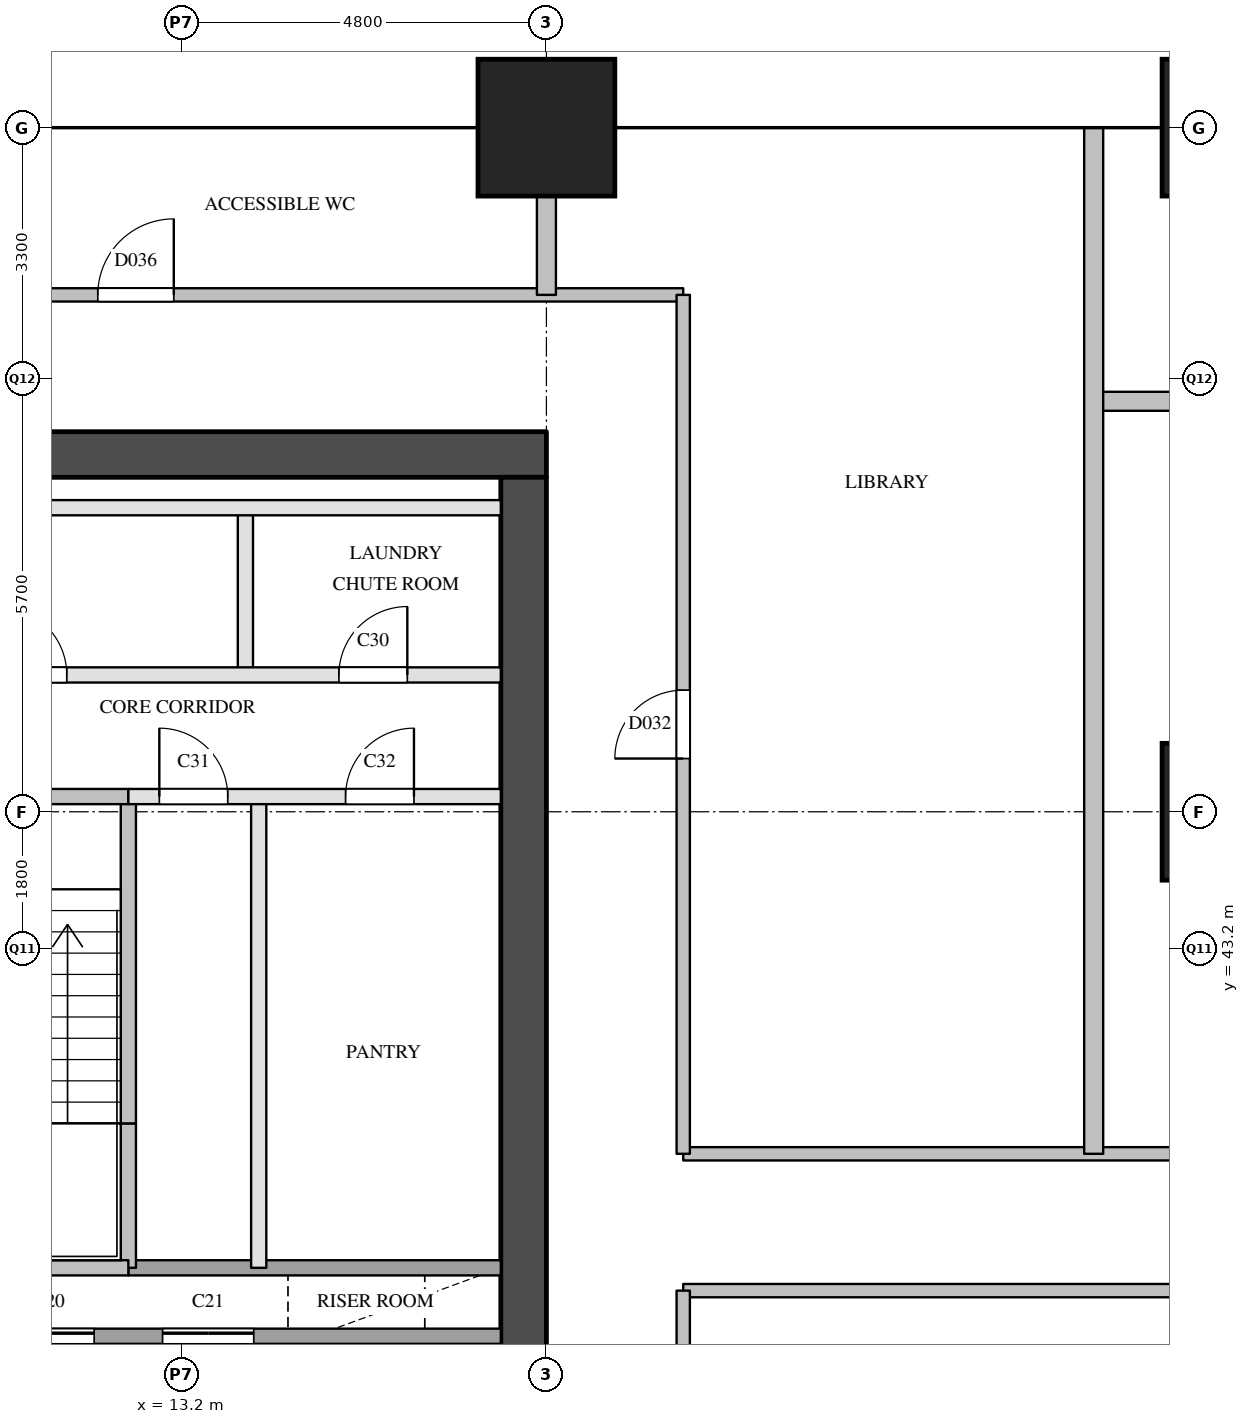
"""IFC4 building model, lengths in metres.
Left out: names, types, materials, properties, quantities, classifications, styles, units other than length and angle.
Written with IfcOpenShell. Run it as: python <this file> out.ifc"""

import sys

from ifc_helpers import new_model, si_unit, direction, frame, frame_2d, origin, origin_2d, place, context, subcontext, project, spatial, rectangle, extrude, element, fill, save


model = new_model("IFC4")
c1 = context("Model", 3, precision=1e-05, world=origin(), true_north=direction((0.0, 1.0)))
c2 = subcontext(c1, "Body", "Model", "MODEL_VIEW")
j1 = project(units=[si_unit("LENGTHUNIT", "METRE"), si_unit("PLANEANGLEUNIT", "RADIAN")], contexts=[c1])
p1 = place(None, origin())
s1 = spatial("IfcSite", under=j1, at=p1, CompositionType="ELEMENT")
p2 = place(p1, origin())
s2 = spatial("IfcBuilding", under=s1, at=p2, CompositionType="ELEMENT")
p3 = place(p2, frame((0.0, 0.0, 112.0)))
s3 = spatial("IfcBuildingStorey", under=s2, at=p3, CompositionType="ELEMENT", Elevation=112.0)
for number, where, z_axis, x_axis in (
    (1, (18.0, 54.0, 0.0), (0.0, 0.0, 1.0), (1.0, 0.0, 0.0)),
    (2, (27.0, 45.0, 0.0), (0.0, 0.0, 1.0), (1.0, 0.0, 0.0)),
    (3, (27.0, 54.0, 0.0), (0.0, 0.0, 1.0), (1.0, 0.0, 0.0)),
):
    element("IfcColumn", number, at=place(p3, frame(where, z_axis=z_axis, x_axis=x_axis)), inside=s3, PredefinedType="COLUMN", context=c2, shape_type="SweptSolid", body=[
        extrude(rectangle(XDim=1.8, YDim=1.8, at=origin_2d()), origin(), (0.0, 0.0, 1.0), 3.8),
    ])
p4 = place(p3, frame((5.6, 49.7, 0.0), z_axis=(0.0, 0.0, 1.0), x_axis=(1.0, 0.0, 0.0)))
e4 = element("IfcWall", 4, at=p4, inside=s3, PredefinedType="SHEAR", context=c2, shape_type="SweptSolid", body=[
    extrude(rectangle(XDim=12.4, YDim=0.6, at=frame_2d((6.2, 0.0))), origin(), (0.0, 0.0, 1.0), 3.5),
])
p5 = place(p3, frame((17.7, 29.1, 0.0), z_axis=(0.0, 0.0, 1.0), x_axis=(0.0, 1.0, 0.0)))
e5 = element("IfcWall", 5, at=p5, inside=s3, PredefinedType="SHEAR", context=c2, shape_type="SweptSolid", body=[
    extrude(rectangle(XDim=20.3, YDim=0.6, at=frame_2d((10.15, 0.0))), origin(), (0.0, 0.0, 1.0), 3.5),
])
p6 = place(p5, frame((1.25, 0.0, 0.0)))
e6 = element("IfcOpeningElement", 6, at=p6, cuts=e5, PredefinedType="OPENING", context=c2, shape_type="SweptSolid", body=[
    extrude(rectangle(XDim=0.7, YDim=2.1, at=frame_2d((0.35, 1.05))), frame((0.0, 0.31, 0.0), z_axis=(0.0, -1.0, 0.0), x_axis=(1.0, 0.0, 0.0)), (0.0, 0.0, 1.0), 0.62),
])
p7 = place(p5, frame((7.05, 0.0, 0.0)))
e7 = element("IfcOpeningElement", 7, at=p7, cuts=e5, PredefinedType="OPENING", context=c2, shape_type="SweptSolid", body=[
    extrude(rectangle(XDim=0.7, YDim=2.1, at=frame_2d((0.35, 1.05))), frame((0.0, 0.31, 0.0), z_axis=(0.0, -1.0, 0.0), x_axis=(1.0, 0.0, 0.0)), (0.0, 0.0, 1.0), 0.62),
])
p8 = place(p3, frame((12.5, 34.9, 0.0), z_axis=(0.0, 0.0, 1.0), x_axis=(0.0, 1.0, 0.0)))
e8 = element("IfcWall", 8, at=p8, inside=s3, PredefinedType="SOLIDWALL", context=c2, shape_type="SweptSolid", body=[
    extrude(rectangle(XDim=3.2, YDim=0.2, at=frame_2d((1.6, 0.0))), origin(), (0.0, 0.0, 1.0), 3.5),
])
p9 = place(p3, frame((12.5, 39.0, 0.0), z_axis=(0.0, 0.0, 1.0), x_axis=(0.0, 1.0, 0.0)))
e9 = element("IfcWall", 9, at=p9, inside=s3, PredefinedType="SOLIDWALL", context=c2, shape_type="SweptSolid", body=[
    extrude(rectangle(XDim=1.9, YDim=0.2, at=frame_2d((0.95, 0.0))), origin(), (0.0, 0.0, 1.0), 3.5),
])
p10 = place(p3, frame((12.5, 40.9, 0.0), z_axis=(0.0, 0.0, 1.0), x_axis=(0.0, 1.0, 0.0)))
e10 = element("IfcWall", 10, at=p10, inside=s3, PredefinedType="SOLIDWALL", context=c2, shape_type="SweptSolid", body=[
    extrude(rectangle(XDim=4.3, YDim=0.2, at=frame_2d((2.15, 0.0))), origin(), (0.0, 0.0, 1.0), 3.5),
])
p11 = place(p3, frame((14.04, 46.8, 0.0), z_axis=(0.0, 0.0, 1.0), x_axis=(0.0, 1.0, 0.0)))
e11 = element("IfcWall", 11, at=p11, inside=s3, PredefinedType="PARTITIONING", context=c2, shape_type="SweptSolid", body=[
    extrude(rectangle(XDim=2.2, YDim=0.2, at=frame_2d((1.1, 0.0))), origin(), (0.0, 0.0, 1.0), 3.5),
])
p12 = place(p3, frame((14.215, 39.0, 0.0), z_axis=(0.0, 0.0, 1.0), x_axis=(0.0, 1.0, 0.0)))
e12 = element("IfcWall", 12, at=p12, inside=s3, PredefinedType="PARTITIONING", context=c2, shape_type="SweptSolid", body=[
    extrude(rectangle(XDim=6.2, YDim=0.2, at=frame_2d((3.1, 0.0))), origin(), (0.0, 0.0, 1.0), 3.5),
])
for number, where, z_axis, x_axis in (
    (13, (14.6, 34.9, 0.0), (0.0, 0.0, 1.0), (0.0, 1.0, 0.0)),
    (14, (16.7, 34.9, 0.0), (0.0, 0.0, 1.0), (0.0, 1.0, 0.0)),
):
    element("IfcWall", number, at=place(p3, frame(where, z_axis=z_axis, x_axis=x_axis)), inside=s3, PredefinedType="SOLIDWALL", context=c2, shape_type="SweptSolid", body=[
        extrude(rectangle(XDim=3.2, YDim=0.2, at=frame_2d((1.6, 0.0))), origin(), (0.0, 0.0, 1.0), 3.5),
    ])
p13 = place(p3, frame((6.2, 38.1, 0.0), z_axis=(0.0, 0.0, 1.0), x_axis=(1.0, 0.0, 0.0)))
e15 = element("IfcWall", 15, at=p13, inside=s3, PredefinedType="SOLIDWALL", context=c2, shape_type="SweptSolid", body=[
    extrude(rectangle(XDim=11.2, YDim=0.2, at=frame_2d((5.6, 0.0))), origin(), (0.0, 0.0, 1.0), 3.5),
])
p14 = place(p13, frame((0.45, 0.0, 0.0)))
e16 = element("IfcOpeningElement", 16, at=p14, cuts=e15, PredefinedType="OPENING", context=c2, shape_type="SweptSolid", body=[
    extrude(rectangle(XDim=1.2, YDim=2.1, at=frame_2d((0.6, 1.05))), frame((0.0, 0.11, 0.0), z_axis=(0.0, -1.0, 0.0), x_axis=(1.0, 0.0, 0.0)), (0.0, 0.0, 1.0), 0.22),
])
p15 = place(p13, frame((2.55, 0.0, 0.0)))
e17 = element("IfcOpeningElement", 17, at=p15, cuts=e15, PredefinedType="OPENING", context=c2, shape_type="SweptSolid", body=[
    extrude(rectangle(XDim=1.2, YDim=2.1, at=frame_2d((0.6, 1.05))), frame((0.0, 0.11, 0.0), z_axis=(0.0, -1.0, 0.0), x_axis=(1.0, 0.0, 0.0)), (0.0, 0.0, 1.0), 0.22),
])
p16 = place(p13, frame((4.65, 0.0, 0.0)))
e18 = element("IfcOpeningElement", 18, at=p16, cuts=e15, PredefinedType="OPENING", context=c2, shape_type="SweptSolid", body=[
    extrude(rectangle(XDim=1.2, YDim=2.1, at=frame_2d((0.6, 1.05))), frame((0.0, 0.11, 0.0), z_axis=(0.0, -1.0, 0.0), x_axis=(1.0, 0.0, 0.0)), (0.0, 0.0, 1.0), 0.22),
])
p17 = place(p13, frame((6.75, 0.0, 0.0)))
e19 = element("IfcOpeningElement", 19, at=p17, cuts=e15, PredefinedType="OPENING", context=c2, shape_type="SweptSolid", body=[
    extrude(rectangle(XDim=1.2, YDim=2.1, at=frame_2d((0.6, 1.05))), frame((0.0, 0.11, 0.0), z_axis=(0.0, -1.0, 0.0), x_axis=(1.0, 0.0, 0.0)), (0.0, 0.0, 1.0), 0.22),
])
p18 = place(p3, frame((12.5, 39.0, 0.0), z_axis=(0.0, 0.0, 1.0), x_axis=(1.0, 0.0, 0.0)))
e20 = element("IfcWall", 20, at=p18, inside=s3, PredefinedType="SOLIDWALL", context=c2, shape_type="SweptSolid", body=[
    extrude(rectangle(XDim=4.9, YDim=0.2, at=frame_2d((2.45, 0.0))), origin(), (0.0, 0.0, 1.0), 3.5),
])
p19 = place(p3, frame((9.45, 39.0, 0.0), z_axis=(0.0, 0.0, 1.0), x_axis=(1.0, 0.0, 0.0)))
e21 = element("IfcWall", 21, at=p19, inside=s3, PredefinedType="SOLIDWALL", context=c2, shape_type="SweptSolid", body=[
    extrude(rectangle(XDim=3.05, YDim=0.2, at=frame_2d((1.525, 0.0))), origin(), (0.0, 0.0, 1.0), 3.5),
])
p20 = place(p3, frame((12.5, 45.2, 0.0), z_axis=(0.0, 0.0, 1.0), x_axis=(1.0, 0.0, 0.0)))
e22 = element("IfcWall", 22, at=p20, inside=s3, PredefinedType="PARTITIONING", context=c2, shape_type="SweptSolid", body=[
    extrude(rectangle(XDim=4.9, YDim=0.2, at=frame_2d((2.45, 0.0))), origin(), (0.0, 0.0, 1.0), 3.5),
])
p21 = place(p20, frame((0.407, 0.0, 0.0)))
e23 = element("IfcOpeningElement", 23, at=p21, cuts=e22, PredefinedType="OPENING", context=c2, shape_type="SweptSolid", body=[
    extrude(rectangle(XDim=0.9, YDim=2.1, at=frame_2d((0.45, 1.05))), frame((0.0, 0.11, 0.0), z_axis=(0.0, -1.0, 0.0), x_axis=(1.0, 0.0, 0.0)), (0.0, 0.0, 1.0), 0.22),
])
p22 = place(p20, frame((2.857, 0.0, 0.0)))
e24 = element("IfcOpeningElement", 24, at=p22, cuts=e22, PredefinedType="OPENING", context=c2, shape_type="SweptSolid", body=[
    extrude(rectangle(XDim=0.9, YDim=2.1, at=frame_2d((0.45, 1.05))), frame((0.0, 0.11, 0.0), z_axis=(0.0, -1.0, 0.0), x_axis=(1.0, 0.0, 0.0)), (0.0, 0.0, 1.0), 0.22),
])
p23 = place(p3, frame((6.2, 45.2, 0.0), z_axis=(0.0, 0.0, 1.0), x_axis=(1.0, 0.0, 0.0)))
e25 = element("IfcWall", 25, at=p23, inside=s3, PredefinedType="SOLIDWALL", context=c2, shape_type="SweptSolid", body=[
    extrude(rectangle(XDim=6.3, YDim=0.2, at=frame_2d((3.15, 0.0))), origin(), (0.0, 0.0, 1.0), 3.5),
])
p24 = place(p23, frame((1.025, 0.0, 0.0)))
e26 = element("IfcOpeningElement", 26, at=p24, cuts=e25, PredefinedType="OPENING", context=c2, shape_type="SweptSolid", body=[
    extrude(rectangle(XDim=1.1, YDim=2.1, at=frame_2d((0.55, 1.05))), frame((0.0, 0.11, 0.0), z_axis=(0.0, -1.0, 0.0), x_axis=(1.0, 0.0, 0.0)), (0.0, 0.0, 1.0), 0.22),
])
p25 = place(p23, frame((4.175, 0.0, 0.0)))
e27 = element("IfcOpeningElement", 27, at=p25, cuts=e25, PredefinedType="OPENING", context=c2, shape_type="SweptSolid", body=[
    extrude(rectangle(XDim=1.1, YDim=2.1, at=frame_2d((0.55, 1.05))), frame((0.0, 0.11, 0.0), z_axis=(0.0, -1.0, 0.0), x_axis=(1.0, 0.0, 0.0)), (0.0, 0.0, 1.0), 0.22),
])
p26 = place(p3, frame((6.2, 46.8, 0.0), z_axis=(0.0, 0.0, 1.0), x_axis=(1.0, 0.0, 0.0)))
e28 = element("IfcWall", 28, at=p26, inside=s3, PredefinedType="PARTITIONING", context=c2, shape_type="SweptSolid", body=[
    extrude(rectangle(XDim=11.2, YDim=0.2, at=frame_2d((5.6, 0.0))), origin(), (0.0, 0.0, 1.0), 3.5),
])
p27 = place(p26, frame((0.67, 0.0, 0.0)))
e29 = element("IfcOpeningElement", 29, at=p27, cuts=e28, PredefinedType="OPENING", context=c2, shape_type="SweptSolid", body=[
    extrude(rectangle(XDim=0.9, YDim=2.1, at=frame_2d((0.45, 1.05))), frame((0.0, 0.11, 0.0), z_axis=(0.0, -1.0, 0.0), x_axis=(1.0, 0.0, 0.0)), (0.0, 0.0, 1.0), 0.22),
])
p28 = place(p26, frame((4.59, 0.0, 0.0)))
e30 = element("IfcOpeningElement", 30, at=p28, cuts=e28, PredefinedType="OPENING", context=c2, shape_type="SweptSolid", body=[
    extrude(rectangle(XDim=0.9, YDim=2.1, at=frame_2d((0.45, 1.05))), frame((0.0, 0.11, 0.0), z_axis=(0.0, -1.0, 0.0), x_axis=(1.0, 0.0, 0.0)), (0.0, 0.0, 1.0), 0.22),
])
p29 = place(p26, frame((9.07, 0.0, 0.0)))
e31 = element("IfcOpeningElement", 31, at=p29, cuts=e28, PredefinedType="OPENING", context=c2, shape_type="SweptSolid", body=[
    extrude(rectangle(XDim=0.9, YDim=2.1, at=frame_2d((0.45, 1.05))), frame((0.0, 0.11, 0.0), z_axis=(0.0, -1.0, 0.0), x_axis=(1.0, 0.0, 0.0)), (0.0, 0.0, 1.0), 0.22),
])
p30 = place(p3, frame((6.2, 49.0, 0.0), z_axis=(0.0, 0.0, 1.0), x_axis=(1.0, 0.0, 0.0)))
e32 = element("IfcWall", 32, at=p30, inside=s3, PredefinedType="PARTITIONING", context=c2, shape_type="SweptSolid", body=[
    extrude(rectangle(XDim=11.2, YDim=0.2, at=frame_2d((5.6, 0.0))), origin(), (0.0, 0.0, 1.0), 3.5),
])
p31 = place(p3, frame((19.8, 38.7, 0.0), z_axis=(0.0, 0.0, 1.0), x_axis=(1.0, 0.0, 0.0)))
e33 = element("IfcWall", 33, at=p31, inside=s3, PredefinedType="PARTITIONING", context=c2, shape_type="SweptSolid", body=[
    extrude(rectangle(XDim=14.4, YDim=0.175, at=frame_2d((7.2, 0.0))), origin(), (0.0, 0.0, 1.0), 2.5),
])
p32 = place(p31, frame((6.7, 0.0, 0.0)))
e34 = element("IfcOpeningElement", 34, at=p32, cuts=e33, PredefinedType="OPENING", context=c2, shape_type="SweptSolid", body=[
    extrude(rectangle(XDim=1.0, YDim=2.1, at=frame_2d((0.5, 1.05))), frame((0.0, 0.097, 0.0), z_axis=(0.0, -1.0, 0.0), x_axis=(1.0, 0.0, 0.0)), (0.0, 0.0, 1.0), 0.195),
])
p33 = place(p3, frame((19.8, 40.5, 0.0), z_axis=(0.0, 0.0, 1.0), x_axis=(1.0, 0.0, 0.0)))
e35 = element("IfcWall", 35, at=p33, inside=s3, PredefinedType="PARTITIONING", context=c2, shape_type="SweptSolid", body=[
    extrude(rectangle(XDim=14.4, YDim=0.175, at=frame_2d((7.2, 0.0))), origin(), (0.0, 0.0, 1.0), 2.5),
])
p34 = place(p3, frame((3.8, 51.8, 0.0), z_axis=(0.0, 0.0, 1.0), x_axis=(1.0, 0.0, 0.0)))
e36 = element("IfcWall", 36, at=p34, inside=s3, PredefinedType="PARTITIONING", context=c2, shape_type="SweptSolid", body=[
    extrude(rectangle(XDim=16.0, YDim=0.175, at=frame_2d((8.0, 0.0))), origin(), (0.0, 0.0, 1.0), 3.5),
])
p35 = place(p34, frame((8.298, 0.0, 0.0)))
e37 = element("IfcOpeningElement", 37, at=p35, cuts=e36, PredefinedType="OPENING", context=c2, shape_type="SweptSolid", body=[
    extrude(rectangle(XDim=1.0, YDim=2.1, at=frame_2d((0.5, 1.05))), frame((0.0, 0.097, 0.0), z_axis=(0.0, -1.0, 0.0), x_axis=(1.0, 0.0, 0.0)), (0.0, 0.0, 1.0), 0.195),
])
p36 = place(p3, frame((19.8, 28.5, 0.0), z_axis=(0.0, 0.0, 1.0), x_axis=(0.0, 1.0, 0.0)))
e38 = element("IfcWall", 38, at=p36, inside=s3, PredefinedType="PARTITIONING", context=c2, shape_type="SweptSolid", body=[
    extrude(rectangle(XDim=10.2, YDim=0.175, at=frame_2d((5.1, 0.0))), origin(), (0.0, 0.0, 1.0), 3.5),
])
p37 = place(p36, frame((3.3, 0.0, 0.0)))
e39 = element("IfcOpeningElement", 39, at=p37, cuts=e38, PredefinedType="OPENING", context=c2, shape_type="SweptSolid", body=[
    extrude(rectangle(XDim=0.9, YDim=2.1, at=frame_2d((0.45, 1.05))), frame((0.0, 0.097, 0.0), z_axis=(0.0, -1.0, 0.0), x_axis=(1.0, 0.0, 0.0)), (0.0, 0.0, 1.0), 0.195),
])
p38 = place(p3, frame((19.8, 40.5, 0.0), z_axis=(0.0, 0.0, 1.0), x_axis=(0.0, 1.0, 0.0)))
e40 = element("IfcWall", 40, at=p38, inside=s3, PredefinedType="PARTITIONING", context=c2, shape_type="SweptSolid", body=[
    extrude(rectangle(XDim=11.3, YDim=0.175, at=frame_2d((5.65, 0.0))), origin(), (0.0, 0.0, 1.0), 3.5),
])
p39 = place(p38, frame((5.2, 0.0, 0.0)))
e41 = element("IfcOpeningElement", 41, at=p39, cuts=e40, PredefinedType="OPENING", context=c2, shape_type="SweptSolid", body=[
    extrude(rectangle(XDim=0.9, YDim=2.1, at=frame_2d((0.45, 1.05))), frame((0.0, 0.097, 0.0), z_axis=(0.0, -1.0, 0.0), x_axis=(1.0, 0.0, 0.0)), (0.0, 0.0, 1.0), 0.195),
])
p40 = place(p3, frame((25.2, 50.4, 0.0), z_axis=(0.0, 0.0, 1.0), x_axis=(1.0, 0.0, 0.0)))
e42 = element("IfcWall", 42, at=p40, inside=s3, PredefinedType="PARTITIONING", context=c2, shape_type="SweptSolid", body=[
    extrude(rectangle(XDim=9.0, YDim=0.25, at=frame_2d((4.5, 0.0))), origin(), (0.0, 0.0, 1.0), 2.5),
])
p41 = place(p3, frame((18.0, 51.8, 0.0), z_axis=(0.0, 0.0, 1.0), x_axis=(0.0, 1.0, 0.0)))
e43 = element("IfcWall", 43, at=p41, inside=s3, PredefinedType="PARTITIONING", context=c2, shape_type="SweptSolid", body=[
    extrude(rectangle(XDim=2.2, YDim=0.25, at=frame_2d((1.1, 0.0))), origin(), (0.0, 0.0, 1.0), 3.5),
])
p42 = place(p3, frame((25.2, 40.5, 0.0), z_axis=(0.0, 0.0, 1.0), x_axis=(0.0, 1.0, 0.0)))
e44 = element("IfcWall", 44, at=p42, inside=s3, PredefinedType="PARTITIONING", context=c2, shape_type="SweptSolid", body=[
    extrude(rectangle(XDim=13.5, YDim=0.25, at=frame_2d((6.75, 0.0))), origin(), (0.0, 0.0, 1.0), 2.5),
])
p43 = place(p16, origin())
e45 = element("IfcDoor", 45, at=p43, inside=s3, OperationType="SLIDING_TO_LEFT", PredefinedType="DOOR", context=c2, shape_type="SweptSolid", body=[
    extrude(rectangle(XDim=1.2, YDim=2.1, at=frame_2d((0.6, 1.05))), frame((0.0, 0.025, 0.0), z_axis=(0.0, -1.0, 0.0), x_axis=(1.0, 0.0, 0.0)), (0.0, 0.0, 1.0), 0.05),
])
fill(e18, e45)
p44 = place(p17, origin())
e46 = element("IfcDoor", 46, at=p44, inside=s3, OperationType="SLIDING_TO_LEFT", PredefinedType="DOOR", context=c2, shape_type="SweptSolid", body=[
    extrude(rectangle(XDim=1.2, YDim=2.1, at=frame_2d((0.6, 1.05))), frame((0.0, 0.025, 0.0), z_axis=(0.0, -1.0, 0.0), x_axis=(1.0, 0.0, 0.0)), (0.0, 0.0, 1.0), 0.05),
])
fill(e19, e46)
p45 = place(p28, origin())
e47 = element("IfcDoor", 47, at=p45, inside=s3, OperationType="SINGLE_SWING_LEFT", PredefinedType="DOOR", context=c2, shape_type="SweptSolid", body=[
    extrude(rectangle(XDim=0.9, YDim=2.1, at=frame_2d((0.45, 1.05))), frame((0.0, 0.025, 0.0), z_axis=(0.0, -1.0, 0.0), x_axis=(1.0, 0.0, 0.0)), (0.0, 0.0, 1.0), 0.05),
])
fill(e30, e47)
p46 = place(p29, origin())
e48 = element("IfcDoor", 48, at=p46, inside=s3, OperationType="SINGLE_SWING_RIGHT", PredefinedType="DOOR", context=c2, shape_type="SweptSolid", body=[
    extrude(rectangle(XDim=0.9, YDim=2.1, at=frame_2d((0.45, 1.05))), frame((0.0, 0.025, 0.0), z_axis=(0.0, -1.0, 0.0), x_axis=(1.0, 0.0, 0.0)), (0.0, 0.0, 1.0), 0.05),
])
fill(e31, e48)
p47 = place(p21, origin())
e49 = element("IfcDoor", 49, at=p47, inside=s3, OperationType="SINGLE_SWING_LEFT", PredefinedType="DOOR", context=c2, shape_type="SweptSolid", body=[
    extrude(rectangle(XDim=0.9, YDim=2.1, at=frame_2d((0.45, 1.05))), frame((0.0, 0.025, 0.0), z_axis=(0.0, -1.0, 0.0), x_axis=(1.0, 0.0, 0.0)), (0.0, 0.0, 1.0), 0.05),
])
fill(e23, e49)
p48 = place(p22, origin())
e50 = element("IfcDoor", 50, at=p48, inside=s3, OperationType="SINGLE_SWING_RIGHT", PredefinedType="DOOR", context=c2, shape_type="SweptSolid", body=[
    extrude(rectangle(XDim=0.9, YDim=2.1, at=frame_2d((0.45, 1.05))), frame((0.0, 0.025, 0.0), z_axis=(0.0, -1.0, 0.0), x_axis=(1.0, 0.0, 0.0)), (0.0, 0.0, 1.0), 0.05),
])
fill(e24, e50)
p49 = place(p39, origin())
e51 = element("IfcDoor", 51, at=p49, inside=s3, OperationType="SINGLE_SWING_LEFT", PredefinedType="DOOR", context=c2, shape_type="SweptSolid", body=[
    extrude(rectangle(XDim=0.9, YDim=2.1, at=frame_2d((0.45, 1.05))), frame((0.0, 0.025, 0.0), z_axis=(0.0, -1.0, 0.0), x_axis=(1.0, 0.0, 0.0)), (0.0, 0.0, 1.0), 0.05),
])
fill(e41, e51)
p50 = place(p35, origin())
e52 = element("IfcDoor", 52, at=p50, inside=s3, OperationType="SINGLE_SWING_RIGHT", PredefinedType="DOOR", context=c2, shape_type="SweptSolid", body=[
    extrude(rectangle(XDim=1.0, YDim=2.1, at=frame_2d((0.5, 1.05))), frame((0.0, 0.025, 0.0), z_axis=(0.0, -1.0, 0.0), x_axis=(1.0, 0.0, 0.0)), (0.0, 0.0, 1.0), 0.05),
])
fill(e37, e52)
save(model, sys.argv[1])
